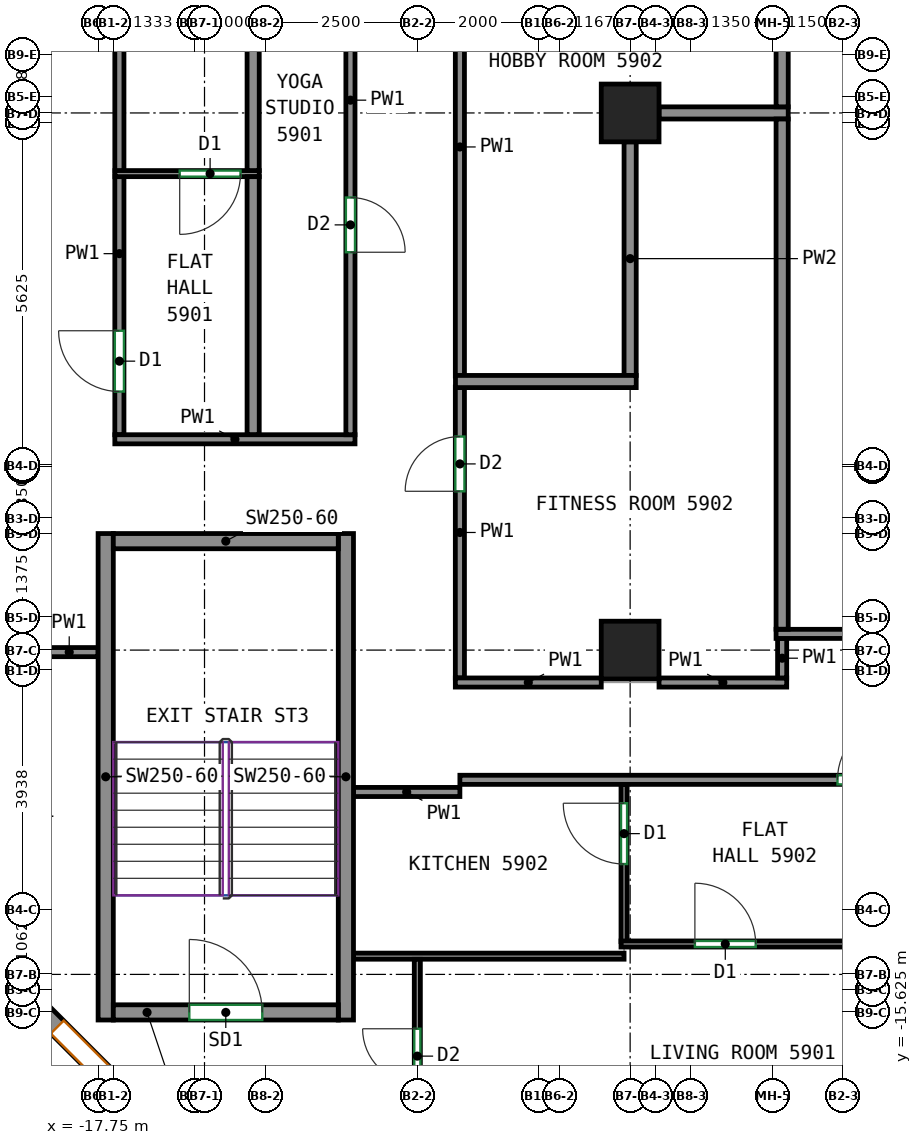
"""IFC4 building model, lengths in metres.
Left out: names, types, materials, properties, quantities, classifications, styles, units other than length and angle.
Written with IfcOpenShell. Run it as: python <this file> out.ifc"""

import sys

from ifc_helpers import new_model, si_unit, direction, frame, frame_2d, origin, origin_2d, place, context, subcontext, project, spatial, rectangle, extrude, source, transform, mapped, element, fill, save


model = new_model("IFC4")
c1 = context("Model", 3, precision=1e-05, world=origin(), true_north=direction((0.0, 1.0)))
c2 = subcontext(c1, "Body", "Model", "MODEL_VIEW")
j1 = project(units=[si_unit("LENGTHUNIT", "METRE"), si_unit("PLANEANGLEUNIT", "RADIAN")], contexts=[c1])
p1 = place(None, origin())
s1 = spatial("IfcSite", under=j1, at=p1, CompositionType="ELEMENT")
p2 = place(p1, origin())
s2 = spatial("IfcBuilding", under=s1, at=p2, CompositionType="ELEMENT")
p3 = place(p2, frame((0.0, 0.0, 245.8)))
s3 = spatial("IfcBuildingStorey", under=s2, at=p3, CompositionType="ELEMENT", Elevation=245.8)
m1 = source(origin(), c2, "Body", "SweptSolid", [
    extrude(rectangle(XDim=0.95, YDim=0.95, at=origin_2d()), origin(), (0.0, 0.0, 1.0), 3.12),
])
for number, where, z_axis, x_axis in (
    (1, (-9.0, -9.667, 0.0), (0.0, 0.0, 1.0), (1.0, 0.0, 0.0)),
    (2, (-9.0, -0.833, 0.0), (0.0, 0.0, 1.0), (1.0, 0.0, 0.0)),
):
    element("IfcColumn", number, at=place(p3, frame(where, z_axis=z_axis, x_axis=x_axis)), inside=s3, PredefinedType="COLUMN", context=c2, shape_type="MappedRepresentation", body=[
        mapped(m1, transform((0.0, 0.0, 0.0))),
    ])
m2 = source(origin(), c2, "Body", "SweptSolid", [
    extrude(rectangle(XDim=8.0, YDim=0.25, at=frame_2d((4.0, 0.0))), origin(), (0.0, 0.0, 1.0), 3.12),
])
for number, where, z_axis, x_axis in (
    (3, (-17.625, -15.75, 0.0), (0.0, 0.0, 1.0), (0.0, 1.0, 0.0)),
    (4, (-13.675, -15.75, 0.0), (0.0, 0.0, 1.0), (0.0, 1.0, 0.0)),
):
    element("IfcWall", number, at=place(p3, frame(where, z_axis=z_axis, x_axis=x_axis)), inside=s3, PredefinedType="SHEAR", context=c2, shape_type="MappedRepresentation", body=[
        mapped(m2, transform((0.0, 0.0, 0.0))),
    ])
m3 = source(origin(), c2, "Body", "SweptSolid", [
    extrude(rectangle(XDim=3.7, YDim=0.25, at=frame_2d((1.85, 0.0))), origin(), (0.0, 0.0, 1.0), 3.12),
])
p4 = place(p3, frame((-17.5, -15.625, 0.0), z_axis=(0.0, 0.0, 1.0), x_axis=(1.0, 0.0, 0.0)))
e5 = element("IfcWall", 5, at=p4, inside=s3, PredefinedType="SHEAR", context=c2, shape_type="MappedRepresentation", body=[
    mapped(m3, transform((0.0, 0.0, 0.0))),
])
p5 = place(p4, frame((1.25, 0.0, 0.0)))
e6 = element("IfcOpeningElement", 6, at=p5, cuts=e5, PredefinedType="OPENING", context=c2, shape_type="SweptSolid", body=[
    extrude(rectangle(XDim=1.2, YDim=2.1, at=frame_2d((0.6, 1.05))), frame((0.0, 0.135, 0.0), z_axis=(0.0, -1.0, 0.0), x_axis=(1.0, 0.0, 0.0)), (0.0, 0.0, 1.0), 0.27),
])
p6 = place(p3, frame((-17.5, -7.875, 0.0), z_axis=(0.0, 0.0, 1.0), x_axis=(1.0, 0.0, 0.0)))
e7 = element("IfcWall", 7, at=p6, inside=s3, PredefinedType="SHEAR", context=c2, shape_type="MappedRepresentation", body=[
    mapped(m3, transform((0.0, 0.0, 0.0))),
])
m4 = source(origin(), c2, "Body", "SweptSolid", [
    extrude(rectangle(XDim=3.323, YDim=0.3, at=frame_2d((1.662, 0.0))), origin(), (0.0, 0.0, 1.0), 3.12),
])
p7 = place(p3, frame((-18.819, -15.469, 0.0), z_axis=(0.0, 0.0, 1.0), x_axis=(0.707070049321, -0.707143511144, 0.0)))
e8 = element("IfcWall", 8, at=p7, inside=s3, PredefinedType="SOLIDWALL", context=c2, shape_type="MappedRepresentation", body=[
    mapped(m4, transform((0.0, 0.0, 0.0))),
])
p8 = place(p7, frame((0.562, 0.0, 0.8)))
e9 = element("IfcOpeningElement", 9, at=p8, cuts=e8, PredefinedType="OPENING", context=c2, shape_type="SweptSolid", body=[
    extrude(rectangle(XDim=2.2, YDim=2.05, at=frame_2d((1.1, 1.025))), frame((0.0, 0.16, 0.0), z_axis=(0.0, -1.0, 0.0), x_axis=(1.0, 0.0, 0.0)), (0.0, 0.0, 1.0), 0.32),
])
p9 = place(p3, frame((-17.4, -6.125, 0.0), z_axis=(0.0, 0.0, 1.0), x_axis=(0.0, 1.0, 0.0)))
e10 = element("IfcWall", 10, at=p9, inside=s3, PredefinedType="PARTITIONING", context=c2, shape_type="SweptSolid", body=[
    extrude(rectangle(XDim=4.254, YDim=0.15, at=frame_2d((2.127, 0.0))), origin(), (0.0, 0.0, 1.0), 3.12),
])
p10 = place(p9, frame((0.71, 0.0, 0.0)))
e11 = element("IfcOpeningElement", 11, at=p10, cuts=e10, PredefinedType="OPENING", context=c2, shape_type="SweptSolid", body=[
    extrude(rectangle(XDim=1.0, YDim=2.1, at=frame_2d((0.5, 1.05))), frame((0.0, 0.085, 0.0), z_axis=(0.0, -1.0, 0.0), x_axis=(1.0, 0.0, 0.0)), (0.0, 0.0, 1.0), 0.17),
])
p11 = place(p3, frame((-17.475, -6.2, 0.0), z_axis=(0.0, 0.0, 1.0), x_axis=(1.0, 0.0, 0.0)))
e12 = element("IfcWall", 12, at=p11, inside=s3, PredefinedType="PARTITIONING", context=c2, shape_type="SweptSolid", body=[
    extrude(rectangle(XDim=3.95, YDim=0.15, at=frame_2d((1.975, 0.0))), origin(), (0.0, 0.0, 1.0), 3.12),
])
p12 = place(p3, frame((-17.4, -1.791, 0.0), z_axis=(0.0, 0.0, 1.0), x_axis=(0.0, 1.0, 0.0)))
e13 = element("IfcWall", 13, at=p12, inside=s3, PredefinedType="PARTITIONING", context=c2, shape_type="SweptSolid", body=[
    extrude(rectangle(XDim=5.925, YDim=0.15, at=frame_2d((2.962, 0.0))), origin(), (0.0, 0.0, 1.0), 3.12),
])
p13 = place(p3, frame((-11.8, -11.8, 0.0), z_axis=(0.0, 0.0, 1.0), x_axis=(1.0, 0.0, 0.0)))
e14 = element("IfcWall", 14, at=p13, inside=s3, PredefinedType="PARTITIONING", context=c2, shape_type="SweptSolid", body=[
    extrude(rectangle(XDim=29.55, YDim=0.15, at=frame_2d((14.775, 0.0))), origin(), (0.0, 0.0, 1.0), 3.12),
])
p14 = place(p13, frame((6.21, 0.0, 0.0)))
e15 = element("IfcOpeningElement", 15, at=p14, cuts=e14, PredefinedType="OPENING", context=c2, shape_type="SweptSolid", body=[
    extrude(rectangle(XDim=1.0, YDim=2.1, at=frame_2d((0.5, 1.05))), frame((0.0, 0.085, 0.0), z_axis=(0.0, -1.0, 0.0), x_axis=(1.0, 0.0, 0.0)), (0.0, 0.0, 1.0), 0.17),
])
p15 = place(p13, frame((23.111, 0.0, 0.0)))
e16 = element("IfcOpeningElement", 16, at=p15, cuts=e14, PredefinedType="OPENING", context=c2, shape_type="SweptSolid", body=[
    extrude(rectangle(XDim=1.0, YDim=2.1, at=frame_2d((0.5, 1.05))), frame((0.0, 0.085, 0.0), z_axis=(0.0, -1.0, 0.0), x_axis=(1.0, 0.0, 0.0)), (0.0, 0.0, 1.0), 0.17),
])
p16 = place(p3, frame((-13.55, -12.0, 0.0), z_axis=(0.0, 0.0, 1.0), x_axis=(1.0, 0.0, 0.0)))
e17 = element("IfcWall", 17, at=p16, inside=s3, PredefinedType="PARTITIONING", context=c2, shape_type="SweptSolid", body=[
    extrude(rectangle(XDim=1.75, YDim=0.15, at=frame_2d((0.875, 0.0))), origin(), (0.0, 0.0, 1.0), 3.12),
])
p17 = place(p3, frame((-18.7, -9.7, 0.0), z_axis=(0.0, 0.0, 1.0), x_axis=(1.0, 0.0, 0.0)))
e18 = element("IfcWall", 18, at=p17, inside=s3, PredefinedType="PARTITIONING", context=c2, shape_type="SweptSolid", body=[
    extrude(rectangle(XDim=0.95, YDim=0.15, at=frame_2d((0.475, 0.0))), origin(), (0.0, 0.0, 1.0), 3.12),
])
p18 = place(p3, frame((-13.6, 4.879, 0.0), z_axis=(0.0, 0.0, 1.0), x_axis=(0.0, -1.0, 0.0)))
e19 = element("IfcWall", 19, at=p18, inside=s3, PredefinedType="PARTITIONING", context=c2, shape_type="SweptSolid", body=[
    extrude(rectangle(XDim=11.004, YDim=0.15, at=frame_2d((5.502, 0.0))), origin(), (0.0, 0.0, 1.0), 3.12),
])
p19 = place(p18, frame((7.103, 0.0, 0.0)))
e20 = element("IfcOpeningElement", 20, at=p19, cuts=e19, PredefinedType="OPENING", context=c2, shape_type="SweptSolid", body=[
    extrude(rectangle(XDim=0.9, YDim=2.1, at=frame_2d((0.45, 1.05))), frame((0.0, 0.085, 0.0), z_axis=(0.0, -1.0, 0.0), x_axis=(1.0, 0.0, 0.0)), (0.0, 0.0, 1.0), 0.17),
])
p20 = place(p3, frame((-11.8, -5.16, 0.0), z_axis=(0.0, 0.0, 1.0), x_axis=(0.0, 1.0, 0.0)))
e21 = element("IfcWall", 21, at=p20, inside=s3, PredefinedType="PARTITIONING", context=c2, shape_type="SweptSolid", body=[
    extrude(rectangle(XDim=7.535, YDim=0.15, at=frame_2d((3.768, 0.0))), origin(), (0.0, 0.0, 1.0), 3.12),
])
p21 = place(p20, frame((5.429, 0.0, 0.0)))
e22 = element("IfcOpeningElement", 22, at=p21, cuts=e21, PredefinedType="OPENING", context=c2, shape_type="SweptSolid", body=[
    extrude(rectangle(XDim=0.9, YDim=2.1, at=frame_2d((0.45, 1.05))), frame((0.0, 0.085, 0.0), z_axis=(0.0, -1.0, 0.0), x_axis=(1.0, 0.0, 0.0)), (0.0, 0.0, 1.0), 0.17),
])
p22 = place(p3, frame((-11.8, -10.125, 0.0), z_axis=(0.0, 0.0, 1.0), x_axis=(0.0, 1.0, 0.0)))
e23 = element("IfcWall", 23, at=p22, inside=s3, PredefinedType="PARTITIONING", context=c2, shape_type="SweptSolid", body=[
    extrude(rectangle(XDim=4.785, YDim=0.15, at=frame_2d((2.393, 0.0))), origin(), (0.0, 0.0, 1.0), 3.12),
])
p23 = place(p22, frame((3.07, 0.0, 0.0)))
e24 = element("IfcOpeningElement", 24, at=p23, cuts=e23, PredefinedType="OPENING", context=c2, shape_type="SweptSolid", body=[
    extrude(rectangle(XDim=0.9, YDim=2.1, at=frame_2d((0.45, 1.05))), frame((0.0, 0.085, 0.0), z_axis=(0.0, -1.0, 0.0), x_axis=(1.0, 0.0, 0.0)), (0.0, 0.0, 1.0), 0.17),
])
p24 = place(p3, frame((-8.525, -10.2, 0.0), z_axis=(0.0, 0.0, 1.0), x_axis=(1.0, 0.0, 0.0)))
e25 = element("IfcWall", 25, at=p24, inside=s3, PredefinedType="PARTITIONING", context=c2, shape_type="SweptSolid", body=[
    extrude(rectangle(XDim=2.1, YDim=0.15, at=frame_2d((1.05, 0.0))), origin(), (0.0, 0.0, 1.0), 3.12),
])
p25 = place(p3, frame((-11.875, -10.2, 0.0), z_axis=(0.0, 0.0, 1.0), x_axis=(1.0, 0.0, 0.0)))
e26 = element("IfcWall", 26, at=p25, inside=s3, PredefinedType="PARTITIONING", context=c2, shape_type="SweptSolid", body=[
    extrude(rectangle(XDim=2.4, YDim=0.15, at=frame_2d((1.2, 0.0))), origin(), (0.0, 0.0, 1.0), 3.12),
])
p26 = place(p3, frame((-6.5, -10.125, 0.0), z_axis=(0.0, 0.0, 1.0), x_axis=(0.0, 1.0, 0.0)))
e27 = element("IfcWall", 27, at=p26, inside=s3, PredefinedType="PARTITIONING", context=c2, shape_type="SweptSolid", body=[
    extrude(rectangle(XDim=0.65, YDim=0.15, at=frame_2d((0.325, 0.0))), origin(), (0.0, 0.0, 1.0), 3.12),
])
p27 = place(p3, frame((8.575, -9.4, 0.0), z_axis=(0.0, 0.0, 1.0), x_axis=(-1.0, 0.0, 0.0)))
e28 = element("IfcWall", 28, at=p27, inside=s3, PredefinedType="PARTITIONING", context=c2, shape_type="SweptSolid", body=[
    extrude(rectangle(XDim=15.175, YDim=0.15, at=frame_2d((7.587, 0.0))), origin(), (0.0, 0.0, 1.0), 3.12),
])
p28 = place(p27, frame((8.646, 0.0, 0.0)))
e29 = element("IfcOpeningElement", 29, at=p28, cuts=e28, PredefinedType="OPENING", context=c2, shape_type="SweptSolid", body=[
    extrude(rectangle(XDim=1.0, YDim=2.1, at=frame_2d((0.5, 1.05))), frame((0.0, 0.085, 0.0), z_axis=(0.0, -1.0, 0.0), x_axis=(1.0, 0.0, 0.0)), (0.0, 0.0, 1.0), 0.17),
])
p29 = place(p3, frame((-15.1, -1.831, 0.0), z_axis=(0.0, 0.0, 1.0), x_axis=(-1.0, 0.0, 0.0)))
e30 = element("IfcWall", 30, at=p29, inside=s3, PredefinedType="PARTITIONING", context=c2, shape_type="SweptSolid", body=[
    extrude(rectangle(XDim=2.373, YDim=0.1, at=frame_2d((1.187, 0.0))), origin(), (0.0, 0.0, 1.0), 3.12),
])
p30 = place(p29, frame((0.308, 0.0, 0.0)))
e31 = element("IfcOpeningElement", 31, at=p30, cuts=e30, PredefinedType="OPENING", context=c2, shape_type="SweptSolid", body=[
    extrude(rectangle(XDim=1.0, YDim=2.1, at=frame_2d((0.5, 1.05))), frame((0.0, 0.06, 0.0), z_axis=(0.0, -1.0, 0.0), x_axis=(1.0, 0.0, 0.0)), (0.0, 0.0, 1.0), 0.12),
])
p31 = place(p3, frame((-15.2, -6.123, 0.0), z_axis=(0.0, 0.0, 1.0), x_axis=(0.0, 1.0, 0.0)))
e32 = element("IfcWall", 32, at=p31, inside=s3, PredefinedType="PARTITIONING", context=c2, shape_type="SweptSolid", body=[
    extrude(rectangle(XDim=4.242, YDim=0.2, at=frame_2d((2.121, 0.0))), origin(), (0.0, 0.0, 1.0), 3.12),
])
p32 = place(p3, frame((-15.2, -1.781, 0.0), z_axis=(0.0, 0.0, 1.0), x_axis=(0.0, 1.0, 0.0)))
e33 = element("IfcWall", 33, at=p32, inside=s3, PredefinedType="PARTITIONING", context=c2, shape_type="SweptSolid", body=[
    extrude(rectangle(XDim=5.905, YDim=0.2, at=frame_2d((2.953, 0.0))), origin(), (0.0, 0.0, 1.0), 3.12),
])
p33 = place(p3, frame((-9.1, -14.46, 0.0), z_axis=(0.0, 0.0, 1.0), x_axis=(0.0, 1.0, 0.0)))
e34 = element("IfcWall", 34, at=p33, inside=s3, PredefinedType="PARTITIONING", context=c2, shape_type="SweptSolid", body=[
    extrude(rectangle(XDim=2.583, YDim=0.1, at=frame_2d((1.292, 0.0))), origin(), (0.0, 0.0, 1.0), 3.12),
])
p34 = place(p33, frame((1.275, 0.0, 0.0)))
e35 = element("IfcOpeningElement", 35, at=p34, cuts=e34, PredefinedType="OPENING", context=c2, shape_type="SweptSolid", body=[
    extrude(rectangle(XDim=1.0, YDim=2.1, at=frame_2d((0.5, 1.05))), frame((0.0, 0.06, 0.0), z_axis=(0.0, -1.0, 0.0), x_axis=(1.0, 0.0, 0.0)), (0.0, 0.0, 1.0), 0.12),
])
p35 = place(p3, frame((-13.55, -14.7, 0.0), z_axis=(0.0, 0.0, 1.0), x_axis=(1.0, 0.0, 0.0)))
e36 = element("IfcWall", 36, at=p35, inside=s3, PredefinedType="PARTITIONING", context=c2, shape_type="SweptSolid", body=[
    extrude(rectangle(XDim=4.45, YDim=0.1, at=frame_2d((2.225, 0.0))), origin(), (0.0, 0.0, 1.0), 3.12),
])
p36 = place(p3, frame((-9.15, -14.5, 0.0), z_axis=(0.0, 0.0, 1.0), x_axis=(1.0, 0.0, 0.0)))
e37 = element("IfcWall", 37, at=p36, inside=s3, PredefinedType="PARTITIONING", context=c2, shape_type="SweptSolid", body=[
    extrude(rectangle(XDim=14.25, YDim=0.1, at=frame_2d((7.125, 0.0))), origin(), (0.0, 0.0, 1.0), 3.12),
])
p37 = place(p36, frame((1.215, 0.0, 0.0)))
e38 = element("IfcOpeningElement", 38, at=p37, cuts=e37, PredefinedType="OPENING", context=c2, shape_type="SweptSolid", body=[
    extrude(rectangle(XDim=1.0, YDim=2.1, at=frame_2d((0.5, 1.05))), frame((0.0, 0.06, 0.0), z_axis=(0.0, -1.0, 0.0), x_axis=(1.0, 0.0, 0.0)), (0.0, 0.0, 1.0), 0.12),
])
p38 = place(p3, frame((-12.5, -18.25, 0.0), z_axis=(0.0, 0.0, 1.0), x_axis=(0.0, 1.0, 0.0)))
e39 = element("IfcWall", 39, at=p38, inside=s3, PredefinedType="PARTITIONING", context=c2, shape_type="SweptSolid", body=[
    extrude(rectangle(XDim=3.498, YDim=0.1, at=frame_2d((1.749, 0.0))), origin(), (0.0, 0.0, 1.0), 3.12),
])
p39 = place(p38, frame((1.456, 0.0, 0.0)))
e40 = element("IfcOpeningElement", 40, at=p39, cuts=e39, PredefinedType="OPENING", context=c2, shape_type="SweptSolid", body=[
    extrude(rectangle(XDim=0.9, YDim=2.1, at=frame_2d((0.45, 1.05))), frame((0.0, 0.06, 0.0), z_axis=(0.0, -1.0, 0.0), x_axis=(1.0, 0.0, 0.0)), (0.0, 0.0, 1.0), 0.12),
])
p40 = place(p3, frame((-8.525, -0.833, 0.0), z_axis=(0.0, 0.0, 1.0), x_axis=(1.0, 0.0, 0.0)))
e41 = element("IfcWall", 41, at=p40, inside=s3, PredefinedType="PARTITIONING", context=c2, shape_type="SweptSolid", body=[
    extrude(rectangle(XDim=2.125, YDim=0.2, at=frame_2d((1.062, 0.0))), origin(), (0.0, 0.0, 1.0), 3.12),
])
p41 = place(p3, frame((-9.0, -5.15, 0.0), z_axis=(0.0, 0.0, 1.0), x_axis=(0.0, 1.0, 0.0)))
e42 = element("IfcWall", 42, at=p41, inside=s3, PredefinedType="PARTITIONING", context=c2, shape_type="SweptSolid", body=[
    extrude(rectangle(XDim=3.842, YDim=0.2, at=frame_2d((1.921, 0.0))), origin(), (0.0, 0.0, 1.0), 2.57),
])
p42 = place(p3, frame((-11.873, -5.25, 0.0), z_axis=(0.0, 0.0, 1.0), x_axis=(1.0, 0.0, 0.0)))
e43 = element("IfcWall", 43, at=p42, inside=s3, PredefinedType="PARTITIONING", context=c2, shape_type="SweptSolid", body=[
    extrude(rectangle(XDim=2.973, YDim=0.2, at=frame_2d((1.487, 0.0))), origin(), (0.0, 0.0, 1.0), 3.12),
])
p43 = place(p3, frame((-6.5, -0.733, 0.0), z_axis=(0.0, 0.0, 1.0), x_axis=(0.0, 1.0, 0.0)))
e44 = element("IfcWall", 44, at=p43, inside=s3, PredefinedType="PARTITIONING", context=c2, shape_type="SweptSolid", body=[
    extrude(rectangle(XDim=4.006, YDim=0.2, at=frame_2d((2.003, 0.0))), origin(), (0.0, 0.0, 1.0), 3.12),
])
p44 = place(p3, frame((-6.5, -9.323, 0.0), z_axis=(0.0, 0.0, 1.0), x_axis=(0.0, 1.0, 0.0)))
e45 = element("IfcWall", 45, at=p44, inside=s3, PredefinedType="PARTITIONING", context=c2, shape_type="SweptSolid", body=[
    extrude(rectangle(XDim=8.39, YDim=0.2, at=frame_2d((4.195, 0.0))), origin(), (0.0, 0.0, 1.0), 3.12),
])
p45 = place(p8, origin())
e46 = element("IfcWindow", 46, at=p45, inside=s3, PartitioningType="SINGLE_PANEL", PredefinedType="WINDOW", context=c2, shape_type="SweptSolid", body=[
    extrude(rectangle(XDim=2.2, YDim=2.05, at=frame_2d((1.1, 1.025))), frame((0.0, 0.03, 0.0), z_axis=(0.0, -1.0, 0.0), x_axis=(1.0, 0.0, 0.0)), (0.0, 0.0, 1.0), 0.06),
])
fill(e9, e46)
p46 = place(p5, origin())
e47 = element("IfcDoor", 47, at=p46, inside=s3, OperationType="DOUBLE_DOOR_SINGLE_SWING", PredefinedType="DOOR", context=c2, shape_type="SweptSolid", body=[
    extrude(rectangle(XDim=1.2, YDim=2.1, at=frame_2d((0.6, 1.05))), frame((0.0, 0.025, 0.0), z_axis=(0.0, -1.0, 0.0), x_axis=(1.0, 0.0, 0.0)), (0.0, 0.0, 1.0), 0.05),
])
fill(e6, e47)
p47 = place(p39, origin())
e48 = element("IfcDoor", 48, at=p47, inside=s3, OperationType="SINGLE_SWING_RIGHT", PredefinedType="DOOR", context=c2, shape_type="SweptSolid", body=[
    extrude(rectangle(XDim=0.9, YDim=2.1, at=frame_2d((0.45, 1.05))), frame((0.0, 0.025, 0.0), z_axis=(0.0, -1.0, 0.0), x_axis=(1.0, 0.0, 0.0)), (0.0, 0.0, 1.0), 0.05),
])
fill(e40, e48)
p48 = place(p37, origin())
e49 = element("IfcDoor", 49, at=p48, inside=s3, OperationType="SINGLE_SWING_LEFT", PredefinedType="DOOR", context=c2, shape_type="SweptSolid", body=[
    extrude(rectangle(XDim=1.0, YDim=2.1, at=frame_2d((0.5, 1.05))), frame((0.0, 0.025, 0.0), z_axis=(0.0, -1.0, 0.0), x_axis=(1.0, 0.0, 0.0)), (0.0, 0.0, 1.0), 0.05),
])
fill(e38, e49)
p49 = place(p34, origin())
e50 = element("IfcDoor", 50, at=p49, inside=s3, OperationType="SINGLE_SWING_RIGHT", PredefinedType="DOOR", context=c2, shape_type="SweptSolid", body=[
    extrude(rectangle(XDim=1.0, YDim=2.1, at=frame_2d((0.5, 1.05))), frame((0.0, 0.025, 0.0), z_axis=(0.0, -1.0, 0.0), x_axis=(1.0, 0.0, 0.0)), (0.0, 0.0, 1.0), 0.05),
])
fill(e35, e50)
p50 = place(p14, origin())
e51 = element("IfcDoor", 51, at=p50, inside=s3, OperationType="SINGLE_SWING_RIGHT", PredefinedType="DOOR", context=c2, shape_type="SweptSolid", body=[
    extrude(rectangle(XDim=1.0, YDim=2.1, at=frame_2d((0.5, 1.05))), frame((0.0, 0.025, 0.0), z_axis=(0.0, -1.0, 0.0), x_axis=(1.0, 0.0, 0.0)), (0.0, 0.0, 1.0), 0.05),
])
fill(e15, e51)
p51 = place(p23, origin())
e52 = element("IfcDoor", 52, at=p51, inside=s3, OperationType="SINGLE_SWING_LEFT", PredefinedType="DOOR", context=c2, shape_type="SweptSolid", body=[
    extrude(rectangle(XDim=0.9, YDim=2.1, at=frame_2d((0.45, 1.05))), frame((0.0, 0.025, 0.0), z_axis=(0.0, -1.0, 0.0), x_axis=(1.0, 0.0, 0.0)), (0.0, 0.0, 1.0), 0.05),
])
fill(e24, e52)
p52 = place(p10, origin())
e53 = element("IfcDoor", 53, at=p52, inside=s3, OperationType="SINGLE_SWING_RIGHT", PredefinedType="DOOR", context=c2, shape_type="SweptSolid", body=[
    extrude(rectangle(XDim=1.0, YDim=2.1, at=frame_2d((0.5, 1.05))), frame((0.0, 0.025, 0.0), z_axis=(0.0, -1.0, 0.0), x_axis=(1.0, 0.0, 0.0)), (0.0, 0.0, 1.0), 0.05),
])
fill(e11, e53)
p53 = place(p19, origin())
e54 = element("IfcDoor", 54, at=p53, inside=s3, OperationType="SINGLE_SWING_RIGHT", PredefinedType="DOOR", context=c2, shape_type="SweptSolid", body=[
    extrude(rectangle(XDim=0.9, YDim=2.1, at=frame_2d((0.45, 1.05))), frame((0.0, 0.025, 0.0), z_axis=(0.0, -1.0, 0.0), x_axis=(1.0, 0.0, 0.0)), (0.0, 0.0, 1.0), 0.05),
])
fill(e20, e54)
p54 = place(p30, origin())
e55 = element("IfcDoor", 55, at=p54, inside=s3, OperationType="SINGLE_SWING_RIGHT", PredefinedType="DOOR", context=c2, shape_type="SweptSolid", body=[
    extrude(rectangle(XDim=1.0, YDim=2.1, at=frame_2d((0.5, 1.05))), frame((0.0, 0.025, 0.0), z_axis=(0.0, -1.0, 0.0), x_axis=(1.0, 0.0, 0.0)), (0.0, 0.0, 1.0), 0.05),
])
fill(e31, e55)
save(model, sys.argv[1])
